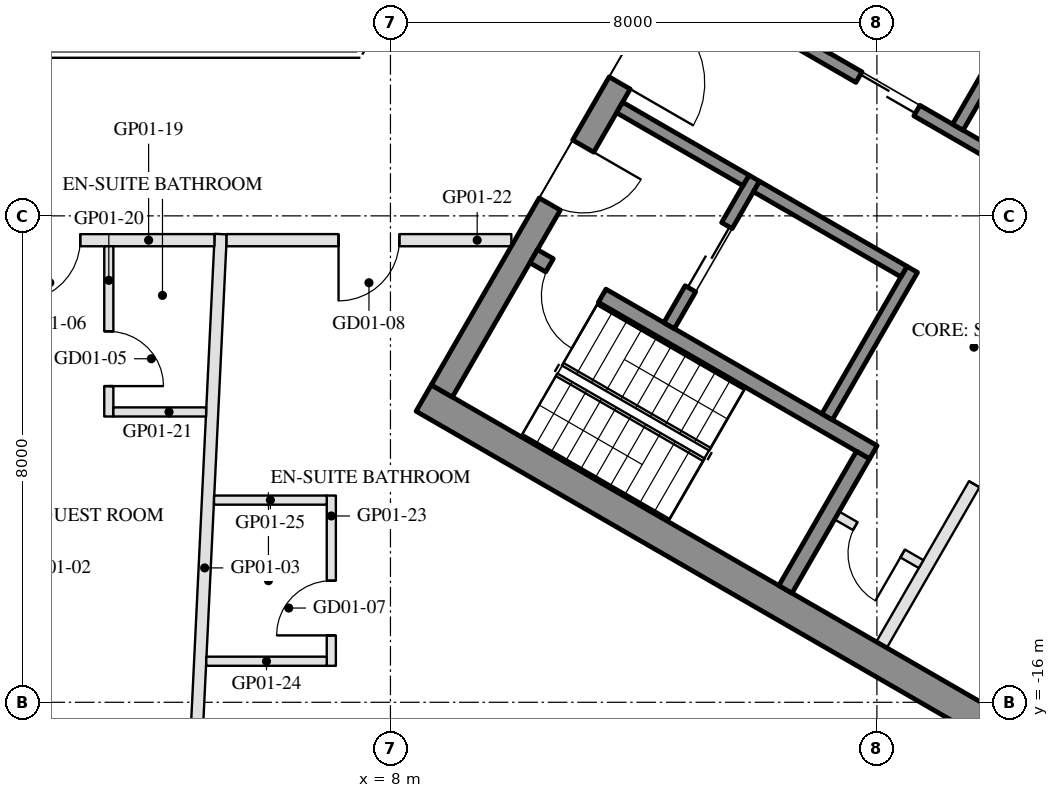
"""IFC4 building model, lengths in metres.
Left out: names, types, materials, properties, quantities, classifications, styles, units other than length and angle.
Written with IfcOpenShell. Run it as: python <this file> out.ifc"""

import sys

from ifc_helpers import new_model, si_unit, direction, frame, frame_2d, origin, place, context, subcontext, project, spatial, rectangle, extrude, element, fill, save


model = new_model("IFC4")
c1 = context("Model", 3, precision=1e-05, world=origin(), true_north=direction((0.0, 1.0)))
c2 = subcontext(c1, "Body", "Model", "MODEL_VIEW")
j1 = project(units=[si_unit("LENGTHUNIT", "METRE"), si_unit("PLANEANGLEUNIT", "RADIAN")], contexts=[c1])
p1 = place(None, origin())
s1 = spatial("IfcSite", under=j1, at=p1, CompositionType="ELEMENT")
p2 = place(p1, origin())
s2 = spatial("IfcBuilding", under=s1, at=p2, CompositionType="ELEMENT")
p3 = place(p2, frame((0.0, 0.0, 46.5)))
s3 = spatial("IfcBuildingStorey", under=s2, at=p3, CompositionType="ELEMENT", Elevation=46.5)
for number, where, z_axis, x_axis in (
    (1, (8.547, -10.997, 0.0), (0.0, 0.0, 1.0), (0.866, -0.5, 0.0)),
    (2, (13.797, -1.903, 0.0), (0.0, 0.0, 1.0), (0.866, -0.5, 0.0)),
):
    element("IfcWall", number, at=place(p3, frame(where, z_axis=z_axis, x_axis=x_axis)), inside=s3, PredefinedType="SHEAR", context=c2, shape_type="SweptSolid", body=[
        extrude(rectangle(XDim=14.837, YDim=0.5, at=frame_2d((7.418, 0.0))), origin(), (0.0, 0.0, 1.0), 3.5),
    ])
p4 = place(p3, frame((8.845, -10.88, 0.0), z_axis=(0.0, 0.0, 1.0), x_axis=(0.500004234368, 0.866022959057, 0.0)))
e3 = element("IfcWall", 3, at=p4, inside=s3, PredefinedType="SHEAR", context=c2, shape_type="SweptSolid", body=[
    extrude(rectangle(XDim=10.0, YDim=0.4, at=frame_2d((5.0, 0.0))), origin(), (0.0, 0.0, 1.0), 3.5),
])
p5 = place(p4, frame((3.55, 0.0, 0.0)))
e4 = element("IfcOpeningElement", 4, at=p5, cuts=e3, PredefinedType="OPENING", context=c2, shape_type="SweptSolid", body=[
    extrude(rectangle(XDim=1.1, YDim=2.1, at=frame_2d((0.55, 1.05))), frame((0.0, 0.21, 0.0), z_axis=(0.0, -1.0, 0.0), x_axis=(1.0, 0.0, 0.0)), (0.0, 0.0, 1.0), 0.42),
])
p6 = place(p4, frame((5.85, 0.0, 0.0)))
e5 = element("IfcOpeningElement", 5, at=p6, cuts=e3, PredefinedType="OPENING", context=c2, shape_type="SweptSolid", body=[
    extrude(rectangle(XDim=1.4, YDim=2.1, at=frame_2d((0.7, 1.05))), frame((0.0, 0.21, 0.0), z_axis=(0.0, -1.0, 0.0), x_axis=(1.0, 0.0, 0.0)), (0.0, 0.0, 1.0), 0.42),
])
p7 = place(p3, frame((10.356, -8.664, 0.0), z_axis=(0.0, 0.0, 1.0), x_axis=(0.866028629588, -0.499994412703, 0.0)))
e6 = element("IfcWall", 6, at=p7, inside=s3, PredefinedType="SHEAR", context=c2, shape_type="SweptSolid", body=[
    extrude(rectangle(XDim=6.45, YDim=0.25, at=frame_2d((3.225, 0.0))), origin(), (0.0, 0.0, 1.0), 3.5),
])
p8 = place(p7, frame((0.3, 0.0, 0.0)))
e7 = element("IfcOpeningElement", 7, at=p8, cuts=e6, PredefinedType="OPENING", context=c2, shape_type="SweptSolid", body=[
    extrude(rectangle(XDim=1.0, YDim=2.1, at=frame_2d((0.5, 1.05))), frame((0.0, 0.135, 0.0), z_axis=(0.0, -1.0, 0.0), x_axis=(1.0, 0.0, 0.0)), (0.0, 0.0, 1.0), 0.27),
])
p9 = place(p3, frame((14.496, -14.143, 0.0), z_axis=(0.0, 0.0, 1.0), x_axis=(0.500062241894, 0.865989465428, 0.0)))
e8 = element("IfcWall", 8, at=p9, inside=s3, PredefinedType="SHEAR", context=c2, shape_type="SweptSolid", body=[
    extrude(rectangle(XDim=2.55, YDim=0.25, at=frame_2d((1.275, 0.0))), origin(), (0.0, 0.0, 1.0), 3.5),
])
p10 = place(p3, frame((15.181, -11.305, 0.0), z_axis=(0.0, 0.0, 1.0), x_axis=(0.49994636267, 0.866056369097, 0.0)))
e9 = element("IfcWall", 9, at=p10, inside=s3, PredefinedType="SHEAR", context=c2, shape_type="SweptSolid", body=[
    extrude(rectangle(XDim=2.8, YDim=0.2, at=frame_2d((1.4, 0.0))), origin(), (0.0, 0.0, 1.0), 3.5),
])
p11 = place(p3, frame((12.583, -9.805, 0.0), z_axis=(0.0, 0.0, 1.0), x_axis=(0.49994636267, 0.866056369097, 0.0)))
e10 = element("IfcWall", 10, at=p11, inside=s3, PredefinedType="SHEAR", context=c2, shape_type="SweptSolid", body=[
    extrude(rectangle(XDim=2.8, YDim=0.2, at=frame_2d((1.4, 0.0))), origin(), (0.0, 0.0, 1.0), 3.5),
])
p12 = place(p11, frame((0.7, 0.0, 0.0)))
e11 = element("IfcOpeningElement", 11, at=p12, cuts=e10, PredefinedType="OPENING", context=c2, shape_type="SweptSolid", body=[
    extrude(rectangle(XDim=1.2, YDim=2.1, at=frame_2d((0.6, 1.05))), frame((0.0, 0.11, 0.0), z_axis=(0.0, -1.0, 0.0), x_axis=(1.0, 0.0, 0.0)), (0.0, 0.0, 1.0), 0.22),
])
p13 = place(p3, frame((11.768, -6.217, 0.0), z_axis=(0.0, 0.0, 1.0), x_axis=(0.866050077142, -0.499957262057, 0.0)))
e12 = element("IfcWall", 12, at=p13, inside=s3, PredefinedType="SHEAR", context=c2, shape_type="SweptSolid", body=[
    extrude(rectangle(XDim=2.4, YDim=0.2, at=frame_2d((1.2, 0.0))), origin(), (0.0, 0.0, 1.0), 3.5),
])
p14 = place(p3, frame((14.02, -7.517, 0.0), z_axis=(0.0, 0.0, 1.0), x_axis=(0.866034573852, -0.49998411664, 0.0)))
e13 = element("IfcWall", 13, at=p14, inside=s3, PredefinedType="SHEAR", context=c2, shape_type="SweptSolid", body=[
    extrude(rectangle(XDim=2.8, YDim=0.2, at=frame_2d((1.4, 0.0))), origin(), (0.0, 0.0, 1.0), 3.5),
])
p15 = place(p3, frame((12.968, -4.138, 0.0), z_axis=(0.0, 0.0, 1.0), x_axis=(0.866028328073, -0.49999493495, 0.0)))
e14 = element("IfcWall", 14, at=p15, inside=s3, PredefinedType="SHEAR", context=c2, shape_type="SweptSolid", body=[
    extrude(rectangle(XDim=10.16, YDim=0.2, at=frame_2d((5.08, 0.0))), origin(), (0.0, 0.0, 1.0), 3.5),
])
p16 = place(p15, frame((0.62, 0.0, 0.0)))
e15 = element("IfcOpeningElement", 15, at=p16, cuts=e14, PredefinedType="OPENING", context=c2, shape_type="SweptSolid", body=[
    extrude(rectangle(XDim=1.1, YDim=2.1, at=frame_2d((0.55, 1.05))), frame((0.0, 0.11, 0.0), z_axis=(0.0, -1.0, 0.0), x_axis=(1.0, 0.0, 0.0)), (0.0, 0.0, 1.0), 0.22),
])
p17 = place(p15, frame((3.16, 0.0, 0.0)))
e16 = element("IfcOpeningElement", 16, at=p17, cuts=e14, PredefinedType="OPENING", context=c2, shape_type="SweptSolid", body=[
    extrude(rectangle(XDim=1.1, YDim=2.1, at=frame_2d((0.55, 1.05))), frame((0.0, 0.11, 0.0), z_axis=(0.0, -1.0, 0.0), x_axis=(1.0, 0.0, 0.0)), (0.0, 0.0, 1.0), 0.22),
])
p18 = place(p15, frame((5.7, 0.0, 0.0)))
e17 = element("IfcOpeningElement", 17, at=p18, cuts=e14, PredefinedType="OPENING", context=c2, shape_type="SweptSolid", body=[
    extrude(rectangle(XDim=1.1, YDim=2.1, at=frame_2d((0.55, 1.05))), frame((0.0, 0.11, 0.0), z_axis=(0.0, -1.0, 0.0), x_axis=(1.0, 0.0, 0.0)), (0.0, 0.0, 1.0), 0.22),
])
p19 = place(p15, frame((8.24, 0.0, 0.0)))
e18 = element("IfcOpeningElement", 18, at=p19, cuts=e14, PredefinedType="OPENING", context=c2, shape_type="SweptSolid", body=[
    extrude(rectangle(XDim=1.1, YDim=2.1, at=frame_2d((0.55, 1.05))), frame((0.0, 0.11, 0.0), z_axis=(0.0, -1.0, 0.0), x_axis=(1.0, 0.0, 0.0)), (0.0, 0.0, 1.0), 0.22),
])
for number, where, z_axis, x_axis in (
    (19, (15.131, -5.272, 0.0), (0.0, 0.0, 1.0), (0.5, 0.866, 0.0)),
    (20, (17.331, -6.542, 0.0), (0.0, 0.0, 1.0), (0.5, 0.866, 0.0)),
):
    element("IfcWall", number, at=place(p3, frame(where, z_axis=z_axis, x_axis=x_axis)), inside=s3, PredefinedType="SHEAR", context=c2, shape_type="SweptSolid", body=[
        extrude(rectangle(XDim=2.0, YDim=0.2, at=frame_2d((1.0, 0.0))), origin(), (0.0, 0.0, 1.0), 3.5),
    ])
p20 = place(p3, frame((16.076, -15.055, 0.0), z_axis=(0.0, 0.0, 1.0), x_axis=(0.499995103361, 0.866028230842, 0.0)))
e21 = element("IfcWall", 21, at=p20, inside=s3, PredefinedType="PARTITIONING", context=c2, shape_type="SweptSolid", body=[
    extrude(rectangle(XDim=5.4, YDim=0.2, at=frame_2d((2.7, 0.0))), origin(), (0.0, 0.0, 1.0), 3.5),
])
p21 = place(p20, frame((3.05, 0.0, 0.0)))
e22 = element("IfcOpeningElement", 22, at=p21, cuts=e21, PredefinedType="OPENING", context=c2, shape_type="SweptSolid", body=[
    extrude(rectangle(XDim=0.9, YDim=2.1, at=frame_2d((0.45, 1.05))), frame((0.0, 0.11, 0.0), z_axis=(0.0, -1.0, 0.0), x_axis=(1.0, 0.0, 0.0)), (0.0, 0.0, 1.0), 0.22),
])
p22 = place(p3, frame((15.342, -12.928, 0.0), z_axis=(0.0, 0.0, 1.0), x_axis=(0.865989903783, -0.500061482766, 0.0)))
e23 = element("IfcWall", 23, at=p22, inside=s3, PredefinedType="PARTITIONING", context=c2, shape_type="SweptSolid", body=[
    extrude(rectangle(XDim=1.6, YDim=0.15, at=frame_2d((0.8, 0.0))), origin(), (0.0, 0.0, 1.0), 3.5),
])
p23 = place(p22, frame((0.35, 0.0, 0.0)))
e24 = element("IfcOpeningElement", 24, at=p23, cuts=e23, PredefinedType="OPENING", context=c2, shape_type="SweptSolid", body=[
    extrude(rectangle(XDim=0.9, YDim=2.1, at=frame_2d((0.45, 1.05))), frame((0.0, 0.085, 0.0), z_axis=(0.0, -1.0, 0.0), x_axis=(1.0, 0.0, 0.0)), (0.0, 0.0, 1.0), 0.17),
])
p24 = place(p3, frame((4.68, -19.28, 0.0), z_axis=(0.0, 0.0, 1.0), x_axis=(0.048194033078, 0.998837992457, 0.0)))
e25 = element("IfcWall", 25, at=p24, inside=s3, PredefinedType="PARTITIONING", context=c2, shape_type="SweptSolid", body=[
    extrude(rectangle(XDim=10.993, YDim=0.2, at=frame_2d((5.496, 0.0))), origin(), (0.0, 0.0, 1.0), 2.96),
])
p25 = place(p3, frame((5.105, -8.4, 0.0), z_axis=(0.0, 0.0, 1.0), x_axis=(-1.0, 0.0, 0.0)))
e26 = element("IfcWall", 26, at=p25, inside=s3, PredefinedType="PARTITIONING", context=c2, shape_type="SweptSolid", body=[
    extrude(rectangle(XDim=3.607, YDim=0.2, at=frame_2d((1.803, 0.0))), origin(), (0.0, 0.0, 1.0), 2.95),
])
p26 = place(p25, frame((2.207, 0.0, 0.0)))
e27 = element("IfcOpeningElement", 27, at=p26, cuts=e26, PredefinedType="OPENING", context=c2, shape_type="SweptSolid", body=[
    extrude(rectangle(XDim=1.0, YDim=2.1, at=frame_2d((0.5, 1.05))), frame((0.0, 0.11, 0.0), z_axis=(0.0, -1.0, 0.0), x_axis=(1.0, 0.0, 0.0)), (0.0, 0.0, 1.0), 0.22),
])
p27 = place(p3, frame((3.368, -8.5, 0.0), z_axis=(0.0, 0.0, 1.0), x_axis=(0.0, -1.0, 0.0)))
e28 = element("IfcWall", 28, at=p27, inside=s3, PredefinedType="PARTITIONING", context=c2, shape_type="SweptSolid", body=[
    extrude(rectangle(XDim=2.8, YDim=0.15, at=frame_2d((1.4, 0.0))), origin(), (0.0, 0.0, 1.0), 3.55),
])
p28 = place(p27, frame((1.4, 0.0, 0.0)))
e29 = element("IfcOpeningElement", 29, at=p28, cuts=e28, PredefinedType="OPENING", context=c2, shape_type="SweptSolid", body=[
    extrude(rectangle(XDim=0.9, YDim=2.1, at=frame_2d((0.45, 1.05))), frame((0.0, 0.085, 0.0), z_axis=(0.0, -1.0, 0.0), x_axis=(1.0, 0.0, 0.0)), (0.0, 0.0, 1.0), 0.17),
])
p29 = place(p3, frame((3.443, -11.225, 0.0), z_axis=(0.0, 0.0, 1.0), x_axis=(1.0, 0.0, 0.0)))
e30 = element("IfcWall", 30, at=p29, inside=s3, PredefinedType="PARTITIONING", context=c2, shape_type="SweptSolid", body=[
    extrude(rectangle(XDim=1.525, YDim=0.15, at=frame_2d((0.763, 0.0))), origin(), (0.0, 0.0, 1.0), 2.95),
])
p30 = place(p3, frame((9.988, -8.4, 0.0), z_axis=(0.0, 0.0, 1.0), x_axis=(-1.0, 0.0, 0.0)))
e31 = element("IfcWall", 31, at=p30, inside=s3, PredefinedType="PARTITIONING", context=c2, shape_type="SweptSolid", body=[
    extrude(rectangle(XDim=4.683, YDim=0.2, at=frame_2d((2.342, 0.0))), origin(), (0.0, 0.0, 1.0), 2.95),
])
p31 = place(p30, frame((1.842, 0.0, 0.0)))
e32 = element("IfcOpeningElement", 32, at=p31, cuts=e31, PredefinedType="OPENING", context=c2, shape_type="SweptSolid", body=[
    extrude(rectangle(XDim=1.0, YDim=2.1, at=frame_2d((0.5, 1.05))), frame((0.0, 0.11, 0.0), z_axis=(0.0, -1.0, 0.0), x_axis=(1.0, 0.0, 0.0)), (0.0, 0.0, 1.0), 0.22),
])
p32 = place(p3, frame((7.027, -15.4, 0.0), z_axis=(0.0, 0.0, 1.0), x_axis=(0.0, 1.0, 0.0)))
e33 = element("IfcWall", 33, at=p32, inside=s3, PredefinedType="PARTITIONING", context=c2, shape_type="SweptSolid", body=[
    extrude(rectangle(XDim=2.8, YDim=0.15, at=frame_2d((1.4, 0.0))), origin(), (0.0, 0.0, 1.0), 3.55),
])
p33 = place(p32, frame((0.5, 0.0, 0.0)))
e34 = element("IfcOpeningElement", 34, at=p33, cuts=e33, PredefinedType="OPENING", context=c2, shape_type="SweptSolid", body=[
    extrude(rectangle(XDim=0.9, YDim=2.1, at=frame_2d((0.45, 1.05))), frame((0.0, 0.085, 0.0), z_axis=(0.0, -1.0, 0.0), x_axis=(1.0, 0.0, 0.0)), (0.0, 0.0, 1.0), 0.17),
])
p34 = place(p3, frame((4.971, -15.325, 0.0), z_axis=(0.0, 0.0, 1.0), x_axis=(1.0, 0.0, 0.0)))
e35 = element("IfcWall", 35, at=p34, inside=s3, PredefinedType="PARTITIONING", context=c2, shape_type="SweptSolid", body=[
    extrude(rectangle(XDim=1.981, YDim=0.15, at=frame_2d((0.991, 0.0))), origin(), (0.0, 0.0, 1.0), 3.55),
])
p35 = place(p3, frame((5.099, -12.675, 0.0), z_axis=(0.0, 0.0, 1.0), x_axis=(1.0, 0.0, 0.0)))
e36 = element("IfcWall", 36, at=p35, inside=s3, PredefinedType="PARTITIONING", context=c2, shape_type="SweptSolid", body=[
    extrude(rectangle(XDim=1.854, YDim=0.15, at=frame_2d((0.927, 0.0))), origin(), (0.0, 0.0, 1.0), 3.55),
])
p36 = place(p12, origin())
e37 = element("IfcDoor", 37, at=p36, inside=s3, OperationType="DOUBLE_DOOR_SLIDING", PredefinedType="DOOR", context=c2, shape_type="SweptSolid", body=[
    extrude(rectangle(XDim=1.2, YDim=2.1, at=frame_2d((0.6, 1.05))), frame((0.0, 0.025, 0.0), z_axis=(0.0, -1.0, 0.0), x_axis=(1.0, 0.0, 0.0)), (0.0, 0.0, 1.0), 0.05),
])
fill(e11, e37)
p37 = place(p23, frame((0.9, 0.0, 0.0), z_axis=(0.0, 0.0, 1.0), x_axis=(-1.0, 0.0, 0.0)))
e38 = element("IfcDoor", 38, at=p37, inside=s3, OperationType="SINGLE_SWING_LEFT", PredefinedType="DOOR", context=c2, shape_type="SweptSolid", body=[
    extrude(rectangle(XDim=0.9, YDim=2.1, at=frame_2d((0.45, 1.05))), frame((0.0, 0.025, 0.0), z_axis=(0.0, -1.0, 0.0), x_axis=(1.0, 0.0, 0.0)), (0.0, 0.0, 1.0), 0.05),
])
fill(e24, e38)
p38 = place(p17, origin())
e39 = element("IfcDoor", 39, at=p38, inside=s3, OperationType="DOUBLE_DOOR_SLIDING", PredefinedType="DOOR", context=c2, shape_type="SweptSolid", body=[
    extrude(rectangle(XDim=1.1, YDim=2.1, at=frame_2d((0.55, 1.05))), frame((0.0, 0.025, 0.0), z_axis=(0.0, -1.0, 0.0), x_axis=(1.0, 0.0, 0.0)), (0.0, 0.0, 1.0), 0.05),
])
fill(e16, e39)
p39 = place(p21, frame((0.9, 0.0, 0.0), z_axis=(0.0, 0.0, 1.0), x_axis=(-1.0, 0.0, 0.0)))
e40 = element("IfcDoor", 40, at=p39, inside=s3, OperationType="SINGLE_SWING_LEFT", PredefinedType="DOOR", context=c2, shape_type="SweptSolid", body=[
    extrude(rectangle(XDim=0.9, YDim=2.1, at=frame_2d((0.45, 1.05))), frame((0.0, 0.025, 0.0), z_axis=(0.0, -1.0, 0.0), x_axis=(1.0, 0.0, 0.0)), (0.0, 0.0, 1.0), 0.05),
])
fill(e22, e40)
p40 = place(p5, frame((1.1, 0.0, 0.0), z_axis=(0.0, 0.0, 1.0), x_axis=(-1.0, 0.0, 0.0)))
e41 = element("IfcDoor", 41, at=p40, inside=s3, OperationType="SINGLE_SWING_LEFT", PredefinedType="DOOR", context=c2, shape_type="SweptSolid", body=[
    extrude(rectangle(XDim=1.1, YDim=2.1, at=frame_2d((0.55, 1.05))), frame((0.0, 0.025, 0.0), z_axis=(0.0, -1.0, 0.0), x_axis=(1.0, 0.0, 0.0)), (0.0, 0.0, 1.0), 0.05),
])
fill(e4, e41)
p41 = place(p6, frame((1.4, 0.0, 0.0), z_axis=(0.0, 0.0, 1.0), x_axis=(-1.0, 0.0, 0.0)))
e42 = element("IfcDoor", 42, at=p41, inside=s3, OperationType="DOUBLE_DOOR_SINGLE_SWING", PredefinedType="DOOR", context=c2, shape_type="SweptSolid", body=[
    extrude(rectangle(XDim=1.4, YDim=2.1, at=frame_2d((0.7, 1.05))), frame((0.0, 0.025, 0.0), z_axis=(0.0, -1.0, 0.0), x_axis=(1.0, 0.0, 0.0)), (0.0, 0.0, 1.0), 0.05),
])
fill(e5, e42)
p42 = place(p8, frame((1.0, 0.0, 0.0), z_axis=(0.0, 0.0, 1.0), x_axis=(-1.0, 0.0, 0.0)))
e43 = element("IfcDoor", 43, at=p42, inside=s3, OperationType="SINGLE_SWING_LEFT", PredefinedType="DOOR", context=c2, shape_type="SweptSolid", body=[
    extrude(rectangle(XDim=1.0, YDim=2.1, at=frame_2d((0.5, 1.05))), frame((0.0, 0.025, 0.0), z_axis=(0.0, -1.0, 0.0), x_axis=(1.0, 0.0, 0.0)), (0.0, 0.0, 1.0), 0.05),
])
fill(e7, e43)
p43 = place(p28, origin())
e44 = element("IfcDoor", 44, at=p43, inside=s3, OperationType="SINGLE_SWING_RIGHT", PredefinedType="DOOR", context=c2, shape_type="SweptSolid", body=[
    extrude(rectangle(XDim=0.9, YDim=2.1, at=frame_2d((0.45, 1.05))), frame((0.0, 0.025, 0.0), z_axis=(0.0, -1.0, 0.0), x_axis=(1.0, 0.0, 0.0)), (0.0, 0.0, 1.0), 0.05),
])
fill(e29, e44)
p44 = place(p26, origin())
e45 = element("IfcDoor", 45, at=p44, inside=s3, OperationType="SINGLE_SWING_RIGHT", PredefinedType="DOOR", context=c2, shape_type="SweptSolid", body=[
    extrude(rectangle(XDim=1.0, YDim=2.1, at=frame_2d((0.5, 1.05))), frame((0.0, 0.025, 0.0), z_axis=(0.0, -1.0, 0.0), x_axis=(1.0, 0.0, 0.0)), (0.0, 0.0, 1.0), 0.05),
])
fill(e27, e45)
p45 = place(p33, origin())
e46 = element("IfcDoor", 46, at=p45, inside=s3, OperationType="SINGLE_SWING_LEFT", PredefinedType="DOOR", context=c2, shape_type="SweptSolid", body=[
    extrude(rectangle(XDim=0.9, YDim=2.1, at=frame_2d((0.45, 1.05))), frame((0.0, 0.025, 0.0), z_axis=(0.0, -1.0, 0.0), x_axis=(1.0, 0.0, 0.0)), (0.0, 0.0, 1.0), 0.05),
])
fill(e34, e46)
p46 = place(p31, origin())
e47 = element("IfcDoor", 47, at=p46, inside=s3, OperationType="SINGLE_SWING_RIGHT", PredefinedType="DOOR", context=c2, shape_type="SweptSolid", body=[
    extrude(rectangle(XDim=1.0, YDim=2.1, at=frame_2d((0.5, 1.05))), frame((0.0, 0.025, 0.0), z_axis=(0.0, -1.0, 0.0), x_axis=(1.0, 0.0, 0.0)), (0.0, 0.0, 1.0), 0.05),
])
fill(e32, e47)
save(model, sys.argv[1])
